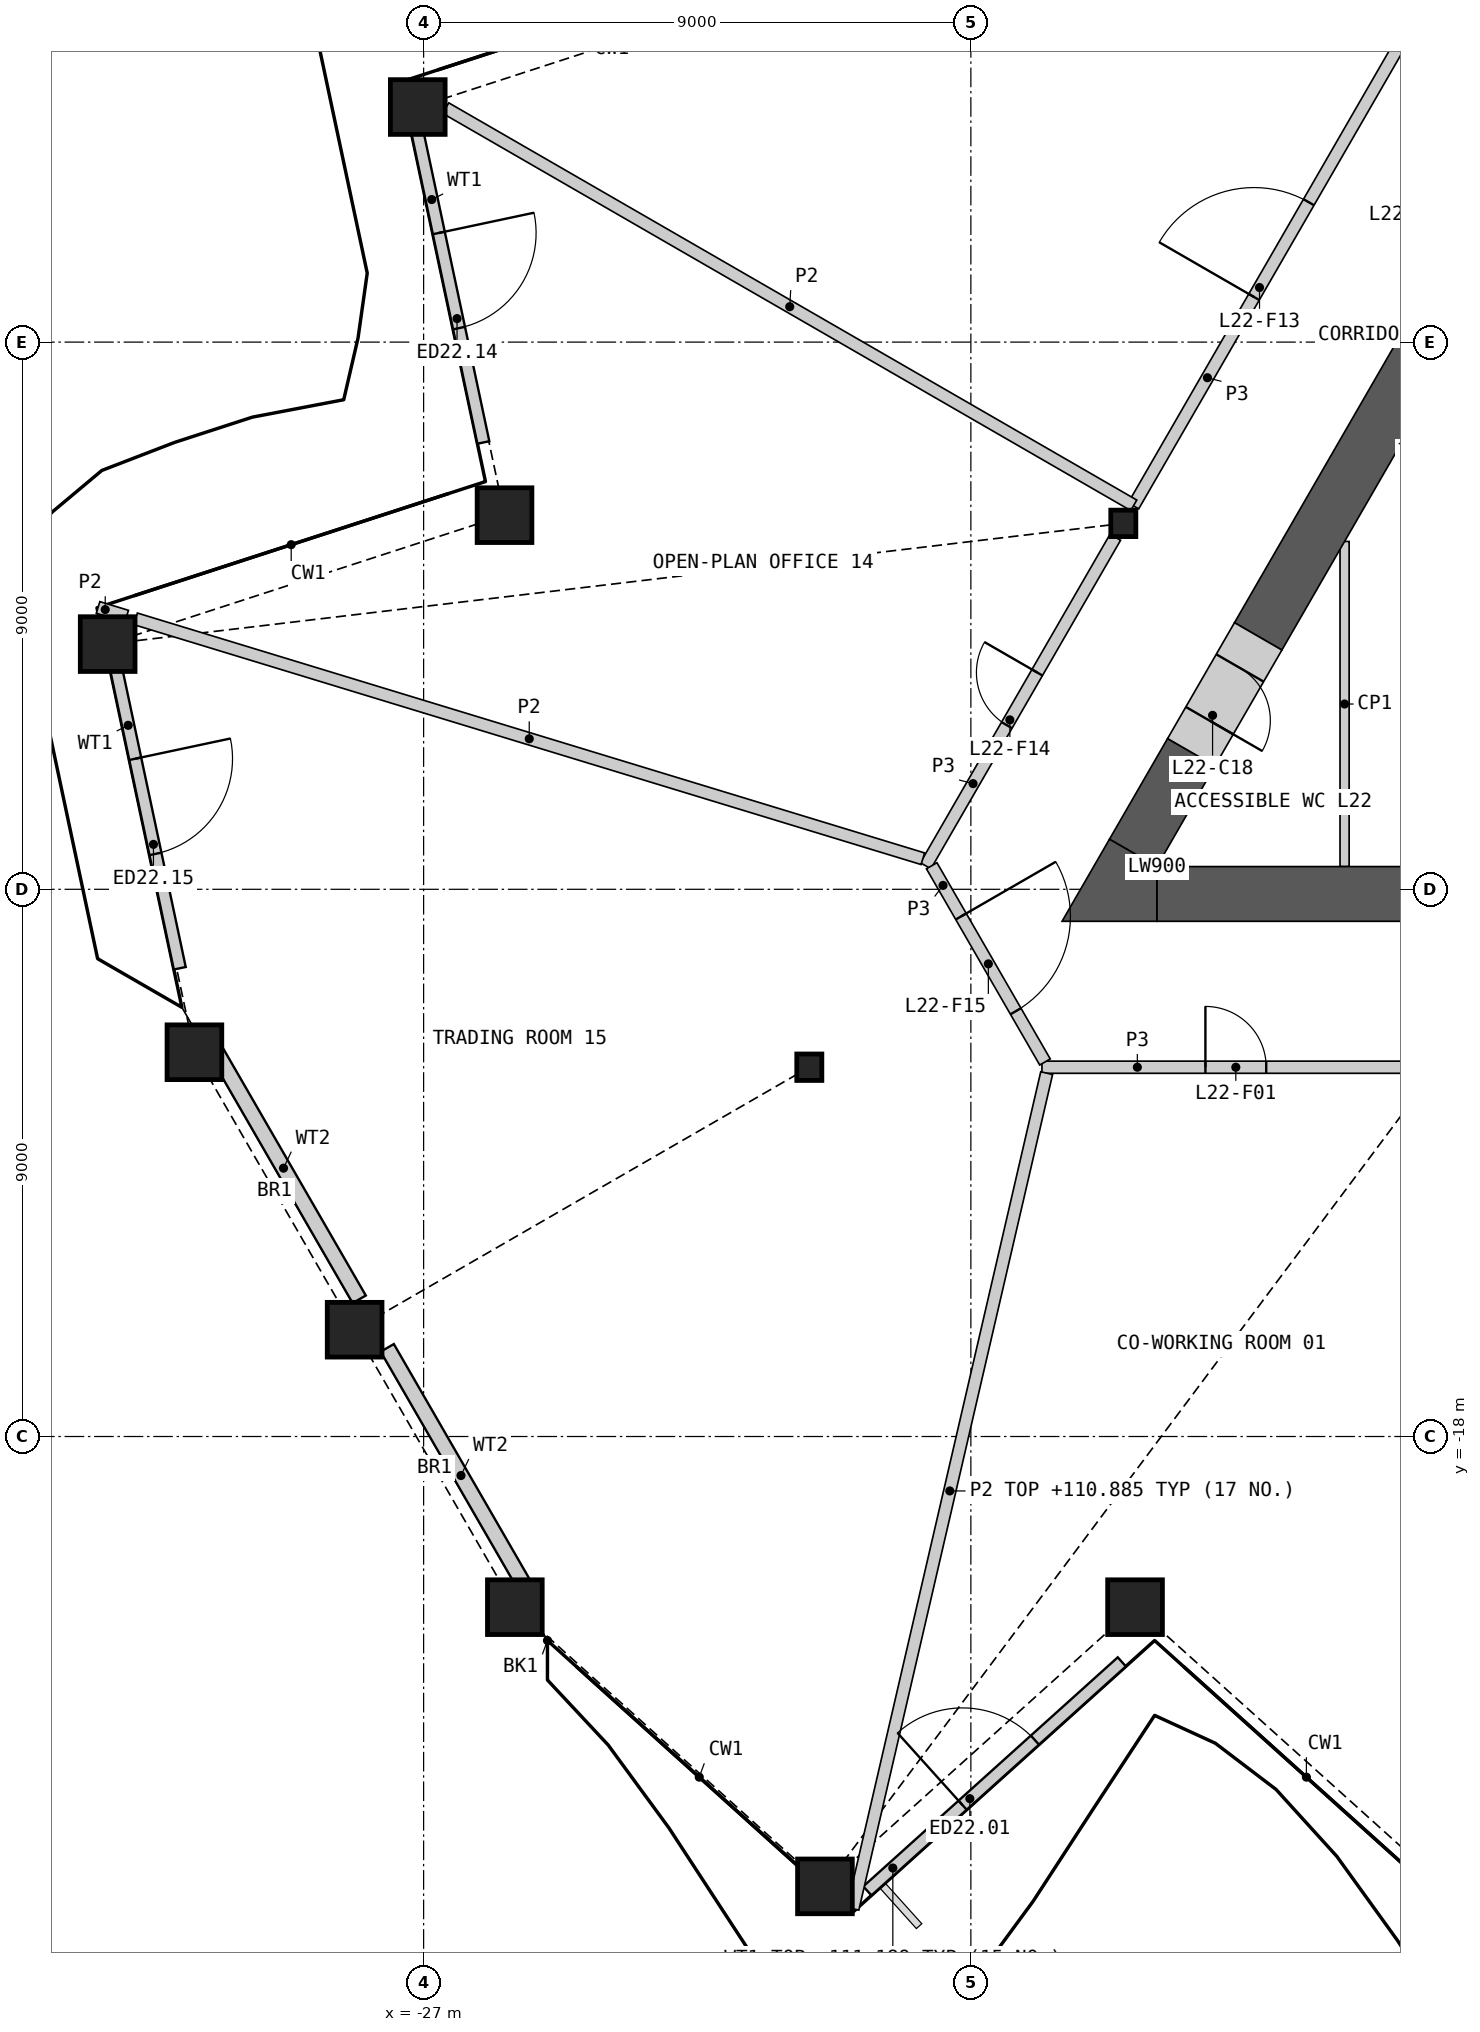
"""IFC4 building model, lengths in metres.
Left out: names, types, materials, properties, quantities, classifications, styles, units other than length and angle.
Written with IfcOpenShell. Run it as: python <this file> out.ifc"""

import sys

from ifc_helpers import new_model, si_unit, direction, frame, frame_2d, origin, origin_2d, place, context, subcontext, project, spatial, polyline, rectangle, hollow_rectangle, i_section, outline, extrude, element, fill, save


model = new_model("IFC4")
c1 = context("Model", 3, precision=1e-05, world=origin(), true_north=direction((0.0, 1.0)))
c2 = subcontext(c1, "Body", "Model", "MODEL_VIEW")
j1 = project(units=[si_unit("LENGTHUNIT", "METRE"), si_unit("PLANEANGLEUNIT", "RADIAN")], contexts=[c1])
p1 = place(None, origin())
s1 = spatial("IfcSite", under=j1, at=p1, CompositionType="ELEMENT")
p2 = place(p1, origin())
s2 = spatial("IfcBuilding", under=s1, at=p2, CompositionType="ELEMENT")
p3 = place(p2, frame((0.0, 0.0, 108.0)))
s3 = spatial("IfcBuildingStorey", under=s2, at=p3, CompositionType="ELEMENT", Elevation=108.0)
for number, where, z_axis, x_axis in (
    (1, (-25.5, -20.807, 0.0), (0.0, 0.0, 1.0), (1.0, 0.0, 0.0)),
    (2, (-20.4, -25.399, 0.0), (0.0, 0.0, 1.0), (1.0, 0.0, 0.0)),
    (3, (-15.3, -20.807, 0.0), (0.0, 0.0, 1.0), (1.0, 0.0, 0.0)),
    (4, (-27.096, 3.866, 0.0), (0.0, 0.0, 1.0), (1.0, 0.0, 0.0)),
    (5, (-25.669, -2.846, 0.0), (0.0, 0.0, 1.0), (1.0, 0.0, 0.0)),
    (6, (-32.196, -4.967, 0.0), (0.0, 0.0, 1.0), (1.0, 0.0, 0.0)),
    (7, (-30.769, -11.68, 0.0), (0.0, 0.0, 1.0), (1.0, 0.0, 0.0)),
    (8, (-28.135, -16.243, 0.0), (0.0, 0.0, 1.0), (1.0, 0.0, 0.0)),
):
    element("IfcColumn", number, at=place(p3, frame(where, z_axis=z_axis, x_axis=x_axis)), inside=s3, PredefinedType="COLUMN", context=c2, shape_type="SweptSolid", body=[
        extrude(hollow_rectangle(XDim=0.9, YDim=0.9, WallThickness=0.06, at=origin_2d()), origin(), (0.0, 0.0, 1.0), 4.2),
    ])
for number, where, z_axis, x_axis in (
    (9, (-15.493, -2.982, 0.0), (0.0, 0.0, 1.0), (1.0, 0.0, 0.0)),
    (10, (-20.657, -11.926, 0.0), (0.0, 0.0, 1.0), (1.0, 0.0, 0.0)),
):
    element("IfcColumn", number, at=place(p3, frame(where, z_axis=z_axis, x_axis=x_axis)), inside=s3, PredefinedType="COLUMN", context=c2, shape_type="SweptSolid", body=[
        extrude(i_section(OverallWidth=0.412, OverallDepth=0.435, WebThickness=0.036, FlangeThickness=0.057, at=origin_2d()), origin(), (0.0, 0.0, 1.0), 4.2),
    ])
p4 = place(p3, frame((-19.702, -25.474, 0.0), z_axis=(0.0, 0.0, 1.0), x_axis=(0.743145362679, 0.669130009736, 0.0)))
e11 = element("IfcWall", 11, at=p4, inside=s3, PredefinedType="SOLIDWALL", context=c2, shape_type="SweptSolid", body=[
    extrude(rectangle(XDim=5.631, YDim=0.2, at=frame_2d((2.815, 0.0))), origin(), (0.0, 0.0, 1.0), 3.189),
])
p5 = place(p4, frame((2.107, 0.0, 0.0)))
e12 = element("IfcOpeningElement", 12, at=p5, cuts=e11, PredefinedType="OPENING", context=c2, shape_type="SweptSolid", body=[
    extrude(rectangle(XDim=1.6, YDim=2.4, at=frame_2d((0.8, 1.2))), frame((0.0, 0.11, 0.0), z_axis=(0.0, -1.0, 0.0), x_axis=(1.0, 0.0, 0.0)), (0.0, 0.0, 1.0), 0.22),
])
p6 = place(p3, frame((-27.15, 3.676, 0.0), z_axis=(0.0, 0.0, 1.0), x_axis=(0.207912369528, -0.978147456469, 0.0)))
e13 = element("IfcWall", 13, at=p6, inside=s3, PredefinedType="SOLIDWALL", context=c2, shape_type="SweptSolid", body=[
    extrude(rectangle(XDim=5.446, YDim=0.2, at=frame_2d((2.723, 0.0))), origin(), (0.0, 0.0, 1.0), 3.189),
])
p7 = place(p6, frame((1.923, 0.0, 0.0)))
e14 = element("IfcOpeningElement", 14, at=p7, cuts=e13, PredefinedType="OPENING", context=c2, shape_type="SweptSolid", body=[
    extrude(rectangle(XDim=1.6, YDim=2.4, at=frame_2d((0.8, 1.2))), frame((0.0, 0.11, 0.0), z_axis=(0.0, -1.0, 0.0), x_axis=(1.0, 0.0, 0.0)), (0.0, 0.0, 1.0), 0.22),
])
p8 = place(p3, frame((-32.142, -4.971, 0.0), z_axis=(0.0, 0.0, 1.0), x_axis=(0.207903253291, -0.978149394148, 0.0)))
e15 = element("IfcWall", 15, at=p8, inside=s3, PredefinedType="SOLIDWALL", context=c2, shape_type="SweptSolid", body=[
    extrude(rectangle(XDim=5.446, YDim=0.2, at=frame_2d((2.723, 0.0))), origin(), (0.0, 0.0, 1.0), 3.189),
])
p9 = place(p8, frame((1.923, 0.0, 0.0)))
e16 = element("IfcOpeningElement", 16, at=p9, cuts=e15, PredefinedType="OPENING", context=c2, shape_type="SweptSolid", body=[
    extrude(rectangle(XDim=1.6, YDim=2.4, at=frame_2d((0.8, 1.2))), frame((0.0, 0.11, 0.0), z_axis=(0.0, -1.0, 0.0), x_axis=(1.0, 0.0, 0.0)), (0.0, 0.0, 1.0), 0.22),
])
p10 = place(p3, frame((-30.549, -11.43, 0.0), z_axis=(0.0, 0.0, 1.0), x_axis=(0.499992577793, -0.866029688955, 0.0)))
e17 = element("IfcWall", 17, at=p10, inside=s3, PredefinedType="SOLIDWALL", context=c2, shape_type="SweptSolid", body=[
    extrude(rectangle(XDim=4.981, YDim=0.25, at=frame_2d((2.49, 0.0))), origin(), (0.0, 0.0, 1.0), 3.189),
])
p11 = place(p3, frame((-27.598, -16.542, 0.0), z_axis=(0.0, 0.0, 1.0), x_axis=(0.499994084299, -0.866028819189, 0.0)))
e18 = element("IfcWall", 18, at=p11, inside=s3, PredefinedType="SOLIDWALL", context=c2, shape_type="SweptSolid", body=[
    extrude(rectangle(XDim=4.85, YDim=0.25, at=frame_2d((2.425, 0.0))), origin(), (0.0, 0.0, 1.0), 3.189),
])
p12 = place(p3, frame((-11.854, -8.626, 0.0), z_axis=(0.0, 0.0, 1.0), x_axis=(0.0, 1.0, 0.0)))
e19 = element("IfcWall", 19, at=p12, inside=s3, PredefinedType="PARTITIONING", context=c2, shape_type="SweptSolid", body=[
    extrude(rectangle(XDim=5.347, YDim=0.15, at=frame_2d((2.674, 0.0))), origin(), (0.0, 0.0, 1.0), 3.8),
])
p13 = place(p3, frame((-14.941, -9.076, 0.0), z_axis=(0.0, 0.0, 1.0), x_axis=(1.0, 0.0, 0.0)))
e20 = element("IfcWall", 20, at=p13, inside=s3, PredefinedType="SHEAR", context=c2, shape_type="SweptSolid", body=[
    extrude(rectangle(XDim=5.627, YDim=0.9, at=frame_2d((2.813, 0.0))), origin(), (0.0, 0.0, 1.0), 3.8),
])
p14 = place(p3, frame((-10.06, 0.728, 0.0), z_axis=(0.0, 0.0, 1.0), x_axis=(-0.500002975332, -0.866023685969, 0.0)))
e21 = element("IfcWall", 21, at=p14, inside=s3, PredefinedType="SHEAR", context=c2, shape_type="SweptSolid", body=[
    extrude(rectangle(XDim=6.429, YDim=0.9, at=frame_2d((3.214, 0.0))), origin(), (0.0, 0.0, 1.0), 3.8),
])
p15 = place(p3, frame((-14.375, -6.745, 0.0), z_axis=(0.0, 0.0, 1.0), x_axis=(-0.499928740635, -0.866066541489, 0.0)))
e22 = element("IfcWall", 22, at=p15, inside=s3, PredefinedType="SHEAR", context=c2, shape_type="SweptSolid", body=[
    extrude(rectangle(XDim=1.912, YDim=0.9, at=frame_2d((0.956, 0.0))), origin(), (0.0, 0.0, 1.0), 3.8),
])
p16 = place(p3, origin())
e23 = element("IfcWall", 23, at=p16, inside=s3, PredefinedType="SHEAR", context=c2, shape_type="SweptSolid", body=[
    extrude(outline(polyline([(-14.941, -8.626), (-14.941, -9.526), (-16.5, -9.526), (-15.721, -8.176), (-14.941, -8.626)])), origin(), (0.0, 0.0, 1.0), 3.8),
])
p17 = place(p3, frame((-13.275, -4.84, 0.0), z_axis=(0.0, 0.0, 1.0), x_axis=(-0.50002983664, -0.866008176907, 0.0)))
e24 = element("IfcWall", 24, at=p17, inside=s3, PredefinedType="SHEAR", context=c2, shape_type="SweptSolid", body=[
    extrude(rectangle(XDim=2.2, YDim=0.9, at=frame_2d((1.1, 0.0))), origin(), (0.0, 0.0, 1.0), 3.8),
])
p18 = place(p17, frame((0.6, 0.0, 0.0)))
e25 = element("IfcOpeningElement", 25, at=p18, cuts=e24, PredefinedType="OPENING", context=c2, shape_type="SweptSolid", body=[
    extrude(rectangle(XDim=1.0, YDim=2.1, at=frame_2d((0.5, 1.05))), frame((0.0, 0.46, 0.0), z_axis=(0.0, -1.0, 0.0), x_axis=(1.0, 0.0, 0.0)), (0.0, 0.0, 1.0), 0.92),
])
p19 = place(p3, frame((-15.326, -2.693, 0.0), z_axis=(0.0, 0.0, 1.0), x_axis=(0.500010522431, 0.866019328571, 0.0)))
e26 = element("IfcWall", 26, at=p19, inside=s3, PredefinedType="PARTITIONING", context=c2, shape_type="SweptSolid", body=[
    extrude(rectangle(XDim=9.733, YDim=0.2, at=frame_2d((4.866, 0.0))), origin(), (0.0, 0.0, 1.0), 3.8),
])
p20 = place(p19, frame((3.966, 0.0, 0.0)))
e27 = element("IfcOpeningElement", 27, at=p20, cuts=e26, PredefinedType="OPENING", context=c2, shape_type="SweptSolid", body=[
    extrude(rectangle(XDim=1.8, YDim=2.1, at=frame_2d((0.9, 1.05))), frame((0.0, 0.11, 0.0), z_axis=(0.0, -1.0, 0.0), x_axis=(1.0, 0.0, 0.0)), (0.0, 0.0, 1.0), 0.22),
])
p21 = place(p3, frame((-16.831, -11.926, 0.0), z_axis=(0.0, 0.0, 1.0), x_axis=(1.0, 0.0, 0.0)))
e28 = element("IfcWall", 28, at=p21, inside=s3, PredefinedType="PARTITIONING", context=c2, shape_type="SweptSolid", body=[
    extrude(rectangle(XDim=6.275, YDim=0.2, at=frame_2d((3.137, 0.0))), origin(), (0.0, 0.0, 1.0), 3.8),
])
p22 = place(p21, frame((2.688, 0.0, 0.0)))
e29 = element("IfcOpeningElement", 29, at=p22, cuts=e28, PredefinedType="OPENING", context=c2, shape_type="SweptSolid", body=[
    extrude(rectangle(XDim=1.0, YDim=2.1, at=frame_2d((0.5, 1.05))), frame((0.0, 0.11, 0.0), z_axis=(0.0, -1.0, 0.0), x_axis=(1.0, 0.0, 0.0)), (0.0, 0.0, 1.0), 0.22),
])
p23 = place(p3, frame((-18.744, -8.613, 0.0), z_axis=(0.0, 0.0, 1.0), x_axis=(0.499997920671, 0.866026604282, 0.0)))
e30 = element("IfcWall", 30, at=p23, inside=s3, PredefinedType="PARTITIONING", context=c2, shape_type="SweptSolid", body=[
    extrude(rectangle(XDim=6.24, YDim=0.2, at=frame_2d((3.12, 0.0))), origin(), (0.0, 0.0, 1.0), 3.8),
])
p24 = place(p23, frame((2.67, 0.0, 0.0)))
e31 = element("IfcOpeningElement", 31, at=p24, cuts=e30, PredefinedType="OPENING", context=c2, shape_type="SweptSolid", body=[
    extrude(rectangle(XDim=1.0, YDim=2.1, at=frame_2d((0.5, 1.05))), frame((0.0, 0.11, 0.0), z_axis=(0.0, -1.0, 0.0), x_axis=(1.0, 0.0, 0.0)), (0.0, 0.0, 1.0), 0.22),
])
p25 = place(p3, frame((-18.644, -8.613, 0.0), z_axis=(0.0, 0.0, 1.0), x_axis=(0.499958791762, -0.866049194065, 0.0)))
e32 = element("IfcWall", 32, at=p25, inside=s3, PredefinedType="PARTITIONING", context=c2, shape_type="SweptSolid", body=[
    extrude(rectangle(XDim=3.726, YDim=0.2, at=frame_2d((1.863, 0.0))), origin(), (0.0, 0.0, 1.0), 3.8),
])
p26 = place(p25, frame((0.963, 0.0, 0.0)))
e33 = element("IfcOpeningElement", 33, at=p26, cuts=e32, PredefinedType="OPENING", context=c2, shape_type="SweptSolid", body=[
    extrude(rectangle(XDim=1.8, YDim=2.1, at=frame_2d((0.9, 1.05))), frame((0.0, 0.11, 0.0), z_axis=(0.0, -1.0, 0.0), x_axis=(1.0, 0.0, 0.0)), (0.0, 0.0, 1.0), 0.22),
])
p27 = place(p3, frame((-19.94, -25.767, 0.0), z_axis=(0.0, 0.0, 1.0), x_axis=(0.225854066841, 0.974161147086, 0.0)))
e34 = element("IfcWall", 34, at=p27, inside=s3, PredefinedType="PARTITIONING", context=c2, shape_type="SweptSolid", body=[
    extrude(rectangle(XDim=14.108, YDim=0.2, at=frame_2d((7.054, 0.0))), origin(), (0.0, 0.0, 1.0), 2.885),
])
p28 = place(p3, frame((-31.736, -4.552, 0.0), z_axis=(0.0, 0.0, 1.0), x_axis=(0.956574643239, -0.291487481569, 0.0)))
e35 = element("IfcWall", 35, at=p28, inside=s3, PredefinedType="PARTITIONING", context=c2, shape_type="SweptSolid", body=[
    extrude(rectangle(XDim=13.534, YDim=0.2, at=frame_2d((6.767, 0.0))), origin(), (0.0, 0.0, 1.0), 2.885),
])
p29 = place(p3, frame((-26.636, 3.848, 0.0), z_axis=(0.0, 0.0, 1.0), x_axis=(0.866029068465, -0.499993652534, 0.0)))
e36 = element("IfcWall", 36, at=p29, inside=s3, PredefinedType="PARTITIONING", context=c2, shape_type="SweptSolid", body=[
    extrude(rectangle(XDim=13.066, YDim=0.2, at=frame_2d((6.533, 0.0))), origin(), (0.0, 0.0, 1.0), 2.885),
])
p30 = place(p3, frame((-32.354, -4.364, 0.0), z_axis=(0.0, 0.0, 1.0), x_axis=(0.956697940105, -0.291082550832, 0.0)))
e37 = element("IfcWall", 37, at=p30, inside=s3, PredefinedType="PARTITIONING", context=c2, shape_type="SweptSolid", body=[
    extrude(rectangle(XDim=0.491, YDim=0.2, at=frame_2d((0.246, 0.0))), origin(), (0.0, 0.0, 1.0), 2.885),
])
p31 = place(p5, origin())
e38 = element("IfcDoor", 38, at=p31, inside=s3, OperationType="DOUBLE_DOOR_SINGLE_SWING", PredefinedType="DOOR", context=c2, shape_type="SweptSolid", body=[
    extrude(rectangle(XDim=1.6, YDim=2.4, at=frame_2d((0.8, 1.2))), frame((0.0, 0.025, 0.0), z_axis=(0.0, -1.0, 0.0), x_axis=(1.0, 0.0, 0.0)), (0.0, 0.0, 1.0), 0.05),
])
fill(e12, e38)
p32 = place(p7, origin())
e39 = element("IfcDoor", 39, at=p32, inside=s3, OperationType="DOUBLE_DOOR_SINGLE_SWING", PredefinedType="DOOR", context=c2, shape_type="SweptSolid", body=[
    extrude(rectangle(XDim=1.6, YDim=2.4, at=frame_2d((0.8, 1.2))), frame((0.0, 0.025, 0.0), z_axis=(0.0, -1.0, 0.0), x_axis=(1.0, 0.0, 0.0)), (0.0, 0.0, 1.0), 0.05),
])
fill(e14, e39)
p33 = place(p9, origin())
e40 = element("IfcDoor", 40, at=p33, inside=s3, OperationType="DOUBLE_DOOR_SINGLE_SWING", PredefinedType="DOOR", context=c2, shape_type="SweptSolid", body=[
    extrude(rectangle(XDim=1.6, YDim=2.4, at=frame_2d((0.8, 1.2))), frame((0.0, 0.025, 0.0), z_axis=(0.0, -1.0, 0.0), x_axis=(1.0, 0.0, 0.0)), (0.0, 0.0, 1.0), 0.05),
])
fill(e16, e40)
p34 = place(p18, origin())
e41 = element("IfcDoor", 41, at=p34, inside=s3, OperationType="SINGLE_SWING_RIGHT", PredefinedType="DOOR", context=c2, shape_type="SweptSolid", body=[
    extrude(rectangle(XDim=1.0, YDim=2.1, at=frame_2d((0.5, 1.05))), frame((0.0, 0.205, 0.0), z_axis=(0.0, -1.0, 0.0), x_axis=(1.0, 0.0, 0.0)), (0.0, 0.0, 1.0), 0.05),
])
fill(e25, e41)
p35 = place(p22, origin())
e42 = element("IfcDoor", 42, at=p35, inside=s3, OperationType="SINGLE_SWING_LEFT", PredefinedType="DOOR", context=c2, shape_type="SweptSolid", body=[
    extrude(rectangle(XDim=1.0, YDim=2.1, at=frame_2d((0.5, 1.05))), frame((0.0, 0.025, 0.0), z_axis=(0.0, -1.0, 0.0), x_axis=(1.0, 0.0, 0.0)), (0.0, 0.0, 1.0), 0.05),
])
fill(e29, e42)
p36 = place(p20, origin())
e43 = element("IfcDoor", 43, at=p36, inside=s3, OperationType="DOUBLE_DOOR_SINGLE_SWING", PredefinedType="DOOR", context=c2, shape_type="SweptSolid", body=[
    extrude(rectangle(XDim=1.8, YDim=2.1, at=frame_2d((0.9, 1.05))), frame((0.0, 0.025, 0.0), z_axis=(0.0, -1.0, 0.0), x_axis=(1.0, 0.0, 0.0)), (0.0, 0.0, 1.0), 0.05),
])
fill(e27, e43)
p37 = place(p24, origin())
e44 = element("IfcDoor", 44, at=p37, inside=s3, OperationType="SINGLE_SWING_RIGHT", PredefinedType="DOOR", context=c2, shape_type="SweptSolid", body=[
    extrude(rectangle(XDim=1.0, YDim=2.1, at=frame_2d((0.5, 1.05))), frame((0.0, 0.025, 0.0), z_axis=(0.0, -1.0, 0.0), x_axis=(1.0, 0.0, 0.0)), (0.0, 0.0, 1.0), 0.05),
])
fill(e31, e44)
p38 = place(p26, origin())
e45 = element("IfcDoor", 45, at=p38, inside=s3, OperationType="DOUBLE_DOOR_SINGLE_SWING", PredefinedType="DOOR", context=c2, shape_type="SweptSolid", body=[
    extrude(rectangle(XDim=1.8, YDim=2.1, at=frame_2d((0.9, 1.05))), frame((0.0, 0.025, 0.0), z_axis=(0.0, -1.0, 0.0), x_axis=(1.0, 0.0, 0.0)), (0.0, 0.0, 1.0), 0.05),
])
fill(e33, e45)
save(model, sys.argv[1])
